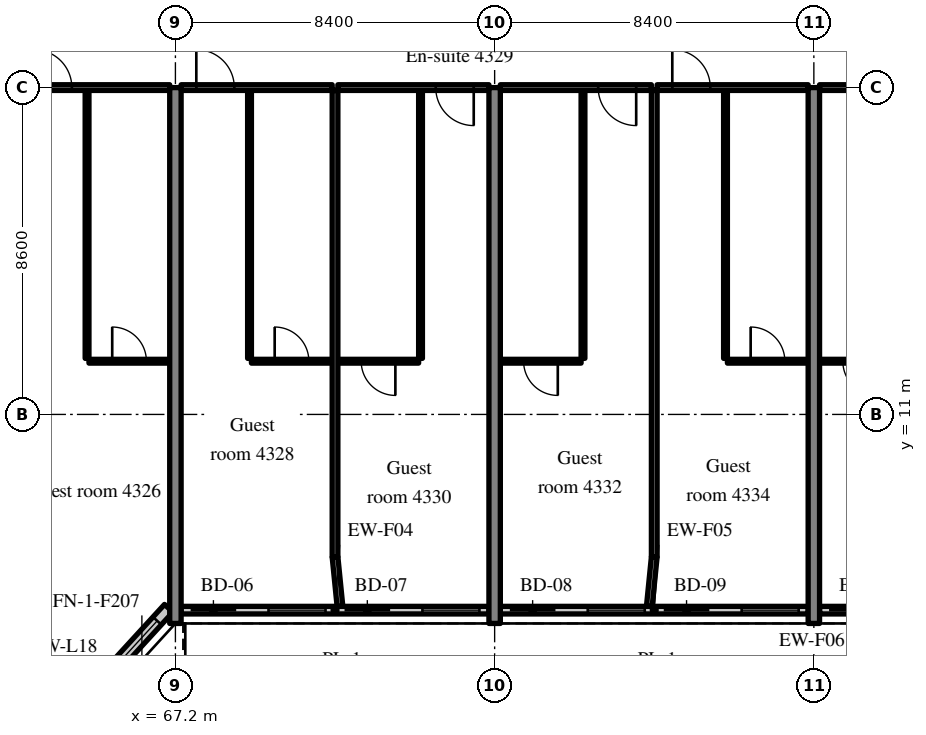
"""IFC4 building model, lengths in metres.
Left out: names, types, materials, properties, quantities, classifications, styles, units other than length and angle.
Written with IfcOpenShell. Run it as: python <this file> out.ifc"""

import sys

from ifc_helpers import new_model, si_unit, direction, frame, frame_2d, origin, place, context, subcontext, project, spatial, rectangle, extrude, source, transform, mapped, element, fill, save


model = new_model("IFC4")
c1 = context("Model", 3, precision=1e-05, world=origin(), true_north=direction((0.0, 1.0)))
c2 = subcontext(c1, "Body", "Model", "MODEL_VIEW")
j1 = project(units=[si_unit("LENGTHUNIT", "METRE"), si_unit("PLANEANGLEUNIT", "RADIAN")], contexts=[c1])
p1 = place(None, origin())
s1 = spatial("IfcSite", under=j1, at=p1, CompositionType="ELEMENT")
p2 = place(p1, origin())
s2 = spatial("IfcBuilding", under=s1, at=p2, CompositionType="ELEMENT")
p3 = place(p2, frame((0.0, 0.0, 178.2)))
s3 = spatial("IfcBuildingStorey", under=s2, at=p3, CompositionType="ELEMENT", Elevation=178.2)
m1 = source(origin(), c2, "Body", "SweptSolid", [
    extrude(rectangle(XDim=14.1, YDim=0.3, at=frame_2d((7.05, 0.0))), origin(), (0.0, 0.0, 1.0), 3.52),
])
for number, where, z_axis, x_axis in (
    (1, (67.2, 5.5, 0.0), (0.0, 0.0, 1.0), (0.0, 1.0, 0.0)),
    (2, (75.6, 5.5, 0.0), (0.0, 0.0, 1.0), (0.0, 1.0, 0.0)),
    (3, (84.0, 5.5, 0.0), (0.0, 0.0, 1.0), (0.0, 1.0, 0.0)),
):
    element("IfcWall", number, at=place(p3, frame(where, z_axis=z_axis, x_axis=x_axis)), inside=s3, PredefinedType="SHEAR", context=c2, shape_type="MappedRepresentation", body=[
        mapped(m1, transform((0.0, 0.0, 0.0), scale=1.0)),
    ])
m2 = source(origin(), c2, "Body", "SweptSolid", [
    extrude(rectangle(XDim=2.398, YDim=0.3, at=frame_2d((1.199, 0.0))), origin(), (0.0, 0.0, 1.0), 3.52),
])
p4 = place(p3, frame((65.404, 4.131, 0.0), z_axis=(0.0, 0.0, 1.0), x_axis=(0.675374189419, 0.737475222815, 0.0)))
e4 = element("IfcWall", 4, at=p4, inside=s3, PredefinedType="SOLIDWALL", context=c2, shape_type="MappedRepresentation", body=[
    mapped(m2, transform((0.0, 0.0, 0.0), scale=1.0)),
])
m3 = source(origin(), c2, "Body", "SweptSolid", [
    extrude(rectangle(XDim=1.5, YDim=2.0, at=frame_2d((0.75, 1.0))), frame((0.0, 0.16, 0.0), z_axis=(0.0, -1.0, 0.0), x_axis=(1.0, 0.0, 0.0)), (0.0, 0.0, 1.0), 0.32),
])
p5 = place(p4, frame((0.449, 0.0, 0.9)))
e5 = element("IfcOpeningElement", 5, at=p5, cuts=e4, PredefinedType="OPENING", context=c2, shape_type="MappedRepresentation", body=[
    mapped(m3, transform((0.0, 0.0, 0.0), scale=1.0)),
])
m4 = source(origin(), c2, "Body", "SweptSolid", [
    extrude(rectangle(XDim=8.1, YDim=0.2, at=frame_2d((4.05, 0.0))), origin(), (0.0, 0.0, 1.0), 2.87),
])
p6 = place(p3, frame((67.35, 5.85, 0.0), z_axis=(0.0, 0.0, 1.0), x_axis=(1.0, 0.0, 0.0)))
e6 = element("IfcWall", 6, at=p6, inside=s3, PredefinedType="SOLIDWALL", context=c2, shape_type="MappedRepresentation", body=[
    mapped(m4, transform((0.0, 0.0, 0.0), scale=1.0)),
])
m5 = source(origin(), c2, "Body", "SweptSolid", [
    extrude(rectangle(XDim=1.2, YDim=2.4, at=frame_2d((0.6, 1.2))), frame((0.0, 0.11, 0.0), z_axis=(0.0, -1.0, 0.0), x_axis=(1.0, 0.0, 0.0)), (0.0, 0.0, 1.0), 0.22),
])
p7 = place(p6, frame((0.25, 0.0, 0.0)))
e7 = element("IfcOpeningElement", 7, at=p7, cuts=e6, PredefinedType="OPENING", context=c2, shape_type="MappedRepresentation", body=[
    mapped(m5, transform((0.0, 0.0, 0.0), scale=1.0)),
])
m6 = source(origin(), c2, "Body", "SweptSolid", [
    extrude(rectangle(XDim=1.5, YDim=1.5, at=frame_2d((0.75, 0.75))), frame((0.0, 0.11, 0.0), z_axis=(0.0, -1.0, 0.0), x_axis=(1.0, 0.0, 0.0)), (0.0, 0.0, 1.0), 0.22),
])
p8 = place(p6, frame((2.3, 0.0, 0.9)))
e8 = element("IfcOpeningElement", 8, at=p8, cuts=e6, PredefinedType="OPENING", context=c2, shape_type="MappedRepresentation", body=[
    mapped(m6, transform((0.0, 0.0, 0.0), scale=1.0)),
])
p9 = place(p6, frame((4.3, 0.0, 0.0)))
e9 = element("IfcOpeningElement", 9, at=p9, cuts=e6, PredefinedType="OPENING", context=c2, shape_type="MappedRepresentation", body=[
    mapped(m5, transform((0.0, 0.0, 0.0), scale=1.0)),
])
p10 = place(p6, frame((6.35, 0.0, 0.9)))
e10 = element("IfcOpeningElement", 10, at=p10, cuts=e6, PredefinedType="OPENING", context=c2, shape_type="MappedRepresentation", body=[
    mapped(m6, transform((0.0, 0.0, 0.0), scale=1.0)),
])
m7 = source(origin(), c2, "Body", "SweptSolid", [
    extrude(rectangle(XDim=8.1, YDim=0.2, at=frame_2d((4.05, 0.0))), origin(), (0.0, 0.0, 1.0), 2.87),
])
p11 = place(p3, frame((75.75, 5.85, 0.0), z_axis=(0.0, 0.0, 1.0), x_axis=(1.0, 0.0, 0.0)))
e11 = element("IfcWall", 11, at=p11, inside=s3, PredefinedType="SOLIDWALL", context=c2, shape_type="MappedRepresentation", body=[
    mapped(m7, transform((0.0, 0.0, 0.0), scale=1.0)),
])
p12 = place(p11, frame((0.25, 0.0, 0.0)))
e12 = element("IfcOpeningElement", 12, at=p12, cuts=e11, PredefinedType="OPENING", context=c2, shape_type="MappedRepresentation", body=[
    mapped(m5, transform((0.0, 0.0, 0.0), scale=1.0)),
])
p13 = place(p11, frame((2.3, 0.0, 0.9)))
e13 = element("IfcOpeningElement", 13, at=p13, cuts=e11, PredefinedType="OPENING", context=c2, shape_type="MappedRepresentation", body=[
    mapped(m6, transform((0.0, 0.0, 0.0), scale=1.0)),
])
p14 = place(p11, frame((4.3, 0.0, 0.0)))
e14 = element("IfcOpeningElement", 14, at=p14, cuts=e11, PredefinedType="OPENING", context=c2, shape_type="MappedRepresentation", body=[
    mapped(m5, transform((0.0, 0.0, 0.0), scale=1.0)),
])
p15 = place(p11, frame((6.35, 0.0, 0.9)))
e15 = element("IfcOpeningElement", 15, at=p15, cuts=e11, PredefinedType="OPENING", context=c2, shape_type="MappedRepresentation", body=[
    mapped(m6, transform((0.0, 0.0, 0.0), scale=1.0)),
])
m8 = source(origin(), c2, "Body", "SweptSolid", [
    extrude(rectangle(XDim=4.105, YDim=0.2, at=frame_2d((2.052, 0.0))), origin(), (0.0, 0.0, 1.0), 2.87),
])
p16 = place(p3, frame((84.15, 5.85, 0.0), z_axis=(0.0, 0.0, 1.0), x_axis=(1.0, 0.0, 0.0)))
e16 = element("IfcWall", 16, at=p16, inside=s3, PredefinedType="SOLIDWALL", context=c2, shape_type="MappedRepresentation", body=[
    mapped(m8, transform((0.0, 0.0, 0.0), scale=1.0)),
])
p17 = place(p16, frame((0.25, 0.0, 0.0)))
e17 = element("IfcOpeningElement", 17, at=p17, cuts=e16, PredefinedType="OPENING", context=c2, shape_type="MappedRepresentation", body=[
    mapped(m5, transform((0.0, 0.0, 0.0), scale=1.0)),
])
p18 = place(p16, frame((2.355, 0.0, 0.9)))
e18 = element("IfcOpeningElement", 18, at=p18, cuts=e16, PredefinedType="OPENING", context=c2, shape_type="MappedRepresentation", body=[
    mapped(m6, transform((0.0, 0.0, 0.0), scale=1.0)),
])
m9 = source(origin(), c2, "Body", "SweptSolid", [
    extrude(rectangle(XDim=7.05, YDim=0.1, at=frame_2d((3.525, 0.0))), origin(), (0.0, 0.0, 1.0), 3.52),
])
p19 = place(p3, frame((64.875, 12.475, 0.0), z_axis=(0.0, 0.0, 1.0), x_axis=(0.0, 1.0, 0.0)))
e19 = element("IfcWall", 19, at=p19, inside=s3, PredefinedType="PARTITIONING", context=c2, shape_type="MappedRepresentation", body=[
    mapped(m9, transform((0.0, 0.0, 0.0), scale=1.0)),
])
m10 = source(origin(), c2, "Body", "SweptSolid", [
    extrude(rectangle(XDim=2.125, YDim=0.1, at=frame_2d((1.062, 0.0))), origin(), (0.0, 0.0, 1.0), 3.52),
])
p20 = place(p3, frame((64.925, 12.4, 0.0), z_axis=(0.0, 0.0, 1.0), x_axis=(1.0, 0.0, 0.0)))
e20 = element("IfcWall", 20, at=p20, inside=s3, PredefinedType="PARTITIONING", context=c2, shape_type="MappedRepresentation", body=[
    mapped(m10, transform((0.0, 0.0, 0.0), scale=1.0)),
])
m11 = source(origin(), c2, "Body", "SweptSolid", [
    extrude(rectangle(XDim=0.9, YDim=2.1, at=frame_2d((0.45, 1.05))), frame((0.0, 0.06, 0.0), z_axis=(0.0, -1.0, 0.0), x_axis=(1.0, 0.0, 0.0)), (0.0, 0.0, 1.0), 0.12),
])
p21 = place(p20, frame((0.612, 0.0, 0.0)))
e21 = element("IfcOpeningElement", 21, at=p21, cuts=e20, PredefinedType="OPENING", context=c2, shape_type="MappedRepresentation", body=[
    mapped(m11, transform((0.0, 0.0, 0.0), scale=1.0)),
])
m12 = source(origin(), c2, "Body", "SweptSolid", [
    extrude(rectangle(XDim=3.975, YDim=0.15, at=frame_2d((1.988, 0.0))), origin(), (0.0, 0.0, 1.0), 2.82),
])
p22 = place(p3, frame((63.075, 19.6, 0.0), z_axis=(0.0, 0.0, 1.0), x_axis=(1.0, 0.0, 0.0)))
e22 = element("IfcWall", 22, at=p22, inside=s3, PredefinedType="PARTITIONING", context=c2, shape_type="MappedRepresentation", body=[
    mapped(m12, transform((0.0, 0.0, 0.0), scale=1.0)),
])
m13 = source(origin(), c2, "Body", "SweptSolid", [
    extrude(rectangle(XDim=1.0, YDim=2.1, at=frame_2d((0.5, 1.05))), frame((0.0, 0.085, 0.0), z_axis=(0.0, -1.0, 0.0), x_axis=(1.0, 0.0, 0.0)), (0.0, 0.0, 1.0), 0.17),
])
p23 = place(p22, frame((0.4, 0.0, 0.0)))
e23 = element("IfcOpeningElement", 23, at=p23, cuts=e22, PredefinedType="OPENING", context=c2, shape_type="MappedRepresentation", body=[
    mapped(m13, transform((0.0, 0.0, 0.0), scale=1.0)),
])
p24 = place(p3, frame((69.15, 12.475, 0.0), z_axis=(0.0, 0.0, 1.0), x_axis=(0.0, 1.0, 0.0)))
e24 = element("IfcWall", 24, at=p24, inside=s3, PredefinedType="PARTITIONING", context=c2, shape_type="MappedRepresentation", body=[
    mapped(m9, transform((0.0, 0.0, 0.0), scale=1.0)),
])
p25 = place(p3, frame((69.2, 12.4, 0.0), z_axis=(0.0, 0.0, 1.0), x_axis=(1.0, 0.0, 0.0)))
e25 = element("IfcWall", 25, at=p25, inside=s3, PredefinedType="PARTITIONING", context=c2, shape_type="MappedRepresentation", body=[
    mapped(m10, transform((0.0, 0.0, 0.0), scale=1.0)),
])
p26 = place(p25, frame((0.612, 0.0, 0.0)))
e26 = element("IfcOpeningElement", 26, at=p26, cuts=e25, PredefinedType="OPENING", context=c2, shape_type="MappedRepresentation", body=[
    mapped(m11, transform((0.0, 0.0, 0.0), scale=1.0)),
])
m14 = source(origin(), c2, "Body", "SweptSolid", [
    extrude(rectangle(XDim=3.975, YDim=0.15, at=frame_2d((1.987, 0.0))), origin(), (0.0, 0.0, 1.0), 2.82),
])
p27 = place(p3, frame((67.35, 19.6, 0.0), z_axis=(0.0, 0.0, 1.0), x_axis=(1.0, 0.0, 0.0)))
e27 = element("IfcWall", 27, at=p27, inside=s3, PredefinedType="PARTITIONING", context=c2, shape_type="MappedRepresentation", body=[
    mapped(m14, transform((0.0, 0.0, 0.0), scale=1.0)),
])
p28 = place(p27, frame((0.4, 0.0, 0.0)))
e28 = element("IfcOpeningElement", 28, at=p28, cuts=e27, PredefinedType="OPENING", context=c2, shape_type="MappedRepresentation", body=[
    mapped(m13, transform((0.0, 0.0, 0.0), scale=1.0)),
])
p29 = place(p3, frame((73.65, 12.475, 0.0), z_axis=(0.0, 0.0, 1.0), x_axis=(0.0, 1.0, 0.0)))
e29 = element("IfcWall", 29, at=p29, inside=s3, PredefinedType="PARTITIONING", context=c2, shape_type="MappedRepresentation", body=[
    mapped(m9, transform((0.0, 0.0, 0.0), scale=1.0)),
])
p30 = place(p3, frame((71.475, 12.4, 0.0), z_axis=(0.0, 0.0, 1.0), x_axis=(1.0, 0.0, 0.0)))
e30 = element("IfcWall", 30, at=p30, inside=s3, PredefinedType="PARTITIONING", context=c2, shape_type="MappedRepresentation", body=[
    mapped(m10, transform((0.0, 0.0, 0.0), scale=1.0)),
])
p31 = place(p30, frame((0.613, 0.0, 0.0)))
e31 = element("IfcOpeningElement", 31, at=p31, cuts=e30, PredefinedType="OPENING", context=c2, shape_type="MappedRepresentation", body=[
    mapped(m11, transform((0.0, 0.0, 0.0), scale=1.0)),
])
p32 = place(p3, frame((71.475, 19.6, 0.0), z_axis=(0.0, 0.0, 1.0), x_axis=(1.0, 0.0, 0.0)))
e32 = element("IfcWall", 32, at=p32, inside=s3, PredefinedType="PARTITIONING", context=c2, shape_type="MappedRepresentation", body=[
    mapped(m14, transform((0.0, 0.0, 0.0), scale=1.0)),
])
p33 = place(p32, frame((2.575, 0.0, 0.0)))
e33 = element("IfcOpeningElement", 33, at=p33, cuts=e32, PredefinedType="OPENING", context=c2, shape_type="MappedRepresentation", body=[
    mapped(m13, transform((0.0, 0.0, 0.0), scale=1.0)),
])
m15 = source(origin(), c2, "Body", "SweptSolid", [
    extrude(rectangle(XDim=12.275, YDim=0.15, at=frame_2d((6.137, 0.0))), origin(), (0.0, 0.0, 1.0), 3.52),
])
p34 = place(p3, frame((71.4, 7.25, 0.0), z_axis=(0.0, 0.0, 1.0), x_axis=(0.0, 1.0, 0.0)))
e34 = element("IfcWall", 34, at=p34, inside=s3, PredefinedType="PARTITIONING", context=c2, shape_type="MappedRepresentation", body=[
    mapped(m15, transform((0.0, 0.0, 0.0), scale=1.0)),
])
p35 = place(p3, frame((77.925, 12.475, 0.0), z_axis=(0.0, 0.0, 1.0), x_axis=(0.0, 1.0, 0.0)))
e35 = element("IfcWall", 35, at=p35, inside=s3, PredefinedType="PARTITIONING", context=c2, shape_type="MappedRepresentation", body=[
    mapped(m9, transform((0.0, 0.0, 0.0), scale=1.0)),
])
p36 = place(p3, frame((75.75, 12.4, 0.0), z_axis=(0.0, 0.0, 1.0), x_axis=(1.0, 0.0, 0.0)))
e36 = element("IfcWall", 36, at=p36, inside=s3, PredefinedType="PARTITIONING", context=c2, shape_type="MappedRepresentation", body=[
    mapped(m10, transform((0.0, 0.0, 0.0), scale=1.0)),
])
p37 = place(p36, frame((0.612, 0.0, 0.0)))
e37 = element("IfcOpeningElement", 37, at=p37, cuts=e36, PredefinedType="OPENING", context=c2, shape_type="MappedRepresentation", body=[
    mapped(m11, transform((0.0, 0.0, 0.0), scale=1.0)),
])
p38 = place(p3, frame((75.75, 19.6, 0.0), z_axis=(0.0, 0.0, 1.0), x_axis=(1.0, 0.0, 0.0)))
e38 = element("IfcWall", 38, at=p38, inside=s3, PredefinedType="PARTITIONING", context=c2, shape_type="MappedRepresentation", body=[
    mapped(m12, transform((0.0, 0.0, 0.0), scale=1.0)),
])
p39 = place(p38, frame((2.575, 0.0, 0.0)))
e39 = element("IfcOpeningElement", 39, at=p39, cuts=e38, PredefinedType="OPENING", context=c2, shape_type="MappedRepresentation", body=[
    mapped(m13, transform((0.0, 0.0, 0.0), scale=1.0)),
])
p40 = place(p3, frame((81.675, 12.475, 0.0), z_axis=(0.0, 0.0, 1.0), x_axis=(0.0, 1.0, 0.0)))
e40 = element("IfcWall", 40, at=p40, inside=s3, PredefinedType="PARTITIONING", context=c2, shape_type="MappedRepresentation", body=[
    mapped(m9, transform((0.0, 0.0, 0.0), scale=1.0)),
])
p41 = place(p3, frame((81.725, 12.4, 0.0), z_axis=(0.0, 0.0, 1.0), x_axis=(1.0, 0.0, 0.0)))
e41 = element("IfcWall", 41, at=p41, inside=s3, PredefinedType="PARTITIONING", context=c2, shape_type="MappedRepresentation", body=[
    mapped(m10, transform((0.0, 0.0, 0.0), scale=1.0)),
])
p42 = place(p41, frame((0.612, 0.0, 0.0)))
e42 = element("IfcOpeningElement", 42, at=p42, cuts=e41, PredefinedType="OPENING", context=c2, shape_type="MappedRepresentation", body=[
    mapped(m11, transform((0.0, 0.0, 0.0), scale=1.0)),
])
p43 = place(p3, frame((79.875, 19.6, 0.0), z_axis=(0.0, 0.0, 1.0), x_axis=(1.0, 0.0, 0.0)))
e43 = element("IfcWall", 43, at=p43, inside=s3, PredefinedType="PARTITIONING", context=c2, shape_type="MappedRepresentation", body=[
    mapped(m12, transform((0.0, 0.0, 0.0), scale=1.0)),
])
p44 = place(p43, frame((0.4, 0.0, 0.0)))
e44 = element("IfcOpeningElement", 44, at=p44, cuts=e43, PredefinedType="OPENING", context=c2, shape_type="MappedRepresentation", body=[
    mapped(m13, transform((0.0, 0.0, 0.0), scale=1.0)),
])
p45 = place(p3, frame((79.8, 7.25, 0.0), z_axis=(0.0, 0.0, 1.0), x_axis=(0.0, 1.0, 0.0)))
e45 = element("IfcWall", 45, at=p45, inside=s3, PredefinedType="PARTITIONING", context=c2, shape_type="MappedRepresentation", body=[
    mapped(m15, transform((0.0, 0.0, 0.0), scale=1.0)),
])
p46 = place(p3, frame((84.15, 12.4, 0.0), z_axis=(0.0, 0.0, 1.0), x_axis=(1.0, 0.0, 0.0)))
e46 = element("IfcWall", 46, at=p46, inside=s3, PredefinedType="PARTITIONING", context=c2, shape_type="MappedRepresentation", body=[
    mapped(m10, transform((0.0, 0.0, 0.0), scale=1.0)),
])
p47 = place(p46, frame((0.612, 0.0, 0.0)))
e47 = element("IfcOpeningElement", 47, at=p47, cuts=e46, PredefinedType="OPENING", context=c2, shape_type="MappedRepresentation", body=[
    mapped(m11, transform((0.0, 0.0, 0.0), scale=1.0)),
])
p48 = place(p3, frame((84.15, 19.6, 0.0), z_axis=(0.0, 0.0, 1.0), x_axis=(1.0, 0.0, 0.0)))
e48 = element("IfcWall", 48, at=p48, inside=s3, PredefinedType="PARTITIONING", context=c2, shape_type="MappedRepresentation", body=[
    mapped(m12, transform((0.0, 0.0, 0.0), scale=1.0)),
])
p49 = place(p48, frame((2.575, 0.0, 0.0)))
e49 = element("IfcOpeningElement", 49, at=p49, cuts=e48, PredefinedType="OPENING", context=c2, shape_type="MappedRepresentation", body=[
    mapped(m13, transform((0.0, 0.0, 0.0), scale=1.0)),
])
m16 = source(origin(), c2, "Body", "SweptSolid", [
    extrude(rectangle(XDim=1.307, YDim=0.15, at=frame_2d((0.653, 0.0))), origin(), (0.0, 0.0, 1.0), 3.52),
])
for number, where, z_axis, x_axis in (
    (50, (71.53, 5.95, 0.0), (0.0, 0.0, 1.0), (-0.1, 0.995, 0.0)),
    (51, (79.67, 5.95, 0.0), (0.0, 0.0, 1.0), (0.1, 0.995, 0.0)),
):
    element("IfcWall", number, at=place(p3, frame(where, z_axis=z_axis, x_axis=x_axis)), inside=s3, PredefinedType="PARTITIONING", context=c2, shape_type="MappedRepresentation", body=[
        mapped(m16, transform((0.0, 0.0, 0.0), scale=1.0)),
    ])
m17 = source(origin(), c2, "Body", "SweptSolid", [
    extrude(rectangle(XDim=1.5, YDim=2.0, at=frame_2d((0.75, 1.0))), frame((0.0, 0.03, 0.0), z_axis=(0.0, -1.0, 0.0), x_axis=(1.0, 0.0, 0.0)), (0.0, 0.0, 1.0), 0.06),
])
p50 = place(p5, origin())
e52 = element("IfcWindow", 52, at=p50, inside=s3, PartitioningType="SINGLE_PANEL", PredefinedType="WINDOW", context=c2, shape_type="MappedRepresentation", body=[
    mapped(m17, transform((0.0, 0.0, 0.0), scale=1.0)),
])
fill(e5, e52)
m18 = source(origin(), c2, "Body", "SweptSolid", [
    extrude(rectangle(XDim=1.2, YDim=2.4, at=frame_2d((0.6, 1.2))), frame((0.0, 0.025, 0.0), z_axis=(0.0, -1.0, 0.0), x_axis=(1.0, 0.0, 0.0)), (0.0, 0.0, 1.0), 0.05),
])
p51 = place(p7, origin())
e53 = element("IfcDoor", 53, at=p51, inside=s3, OperationType="SLIDING_TO_RIGHT", PredefinedType="DOOR", context=c2, shape_type="MappedRepresentation", body=[
    mapped(m18, transform((0.0, 0.0, 0.0), scale=1.0)),
])
fill(e7, e53)
m19 = source(origin(), c2, "Body", "SweptSolid", [
    extrude(rectangle(XDim=1.5, YDim=1.5, at=frame_2d((0.75, 0.75))), frame((0.0, 0.03, 0.0), z_axis=(0.0, -1.0, 0.0), x_axis=(1.0, 0.0, 0.0)), (0.0, 0.0, 1.0), 0.06),
])
p52 = place(p8, origin())
e54 = element("IfcWindow", 54, at=p52, inside=s3, PartitioningType="SINGLE_PANEL", PredefinedType="WINDOW", context=c2, shape_type="MappedRepresentation", body=[
    mapped(m19, transform((0.0, 0.0, 0.0), scale=1.0)),
])
fill(e8, e54)
p53 = place(p9, origin())
e55 = element("IfcDoor", 55, at=p53, inside=s3, OperationType="SLIDING_TO_LEFT", PredefinedType="DOOR", context=c2, shape_type="MappedRepresentation", body=[
    mapped(m18, transform((0.0, 0.0, 0.0), scale=1.0)),
])
fill(e9, e55)
p54 = place(p10, origin())
e56 = element("IfcWindow", 56, at=p54, inside=s3, PartitioningType="SINGLE_PANEL", PredefinedType="WINDOW", context=c2, shape_type="MappedRepresentation", body=[
    mapped(m19, transform((0.0, 0.0, 0.0), scale=1.0)),
])
fill(e10, e56)
p55 = place(p12, origin())
e57 = element("IfcDoor", 57, at=p55, inside=s3, OperationType="SLIDING_TO_RIGHT", PredefinedType="DOOR", context=c2, shape_type="MappedRepresentation", body=[
    mapped(m18, transform((0.0, 0.0, 0.0), scale=1.0)),
])
fill(e12, e57)
p56 = place(p13, origin())
e58 = element("IfcWindow", 58, at=p56, inside=s3, PartitioningType="SINGLE_PANEL", PredefinedType="WINDOW", context=c2, shape_type="MappedRepresentation", body=[
    mapped(m19, transform((0.0, 0.0, 0.0), scale=1.0)),
])
fill(e13, e58)
p57 = place(p14, origin())
e59 = element("IfcDoor", 59, at=p57, inside=s3, OperationType="SLIDING_TO_LEFT", PredefinedType="DOOR", context=c2, shape_type="MappedRepresentation", body=[
    mapped(m18, transform((0.0, 0.0, 0.0), scale=1.0)),
])
fill(e14, e59)
p58 = place(p15, origin())
e60 = element("IfcWindow", 60, at=p58, inside=s3, PartitioningType="SINGLE_PANEL", PredefinedType="WINDOW", context=c2, shape_type="MappedRepresentation", body=[
    mapped(m19, transform((0.0, 0.0, 0.0), scale=1.0)),
])
fill(e15, e60)
p59 = place(p17, origin())
e61 = element("IfcDoor", 61, at=p59, inside=s3, OperationType="SLIDING_TO_RIGHT", PredefinedType="DOOR", context=c2, shape_type="MappedRepresentation", body=[
    mapped(m18, transform((0.0, 0.0, 0.0), scale=1.0)),
])
fill(e17, e61)
m20 = source(origin(), c2, "Body", "SweptSolid", [
    extrude(rectangle(XDim=0.9, YDim=2.1, at=frame_2d((0.45, 1.05))), frame((0.0, 0.025, 0.0), z_axis=(0.0, -1.0, 0.0), x_axis=(1.0, 0.0, 0.0)), (0.0, 0.0, 1.0), 0.05),
])
p60 = place(p21, origin())
e62 = element("IfcDoor", 62, at=p60, inside=s3, OperationType="SINGLE_SWING_LEFT", PredefinedType="DOOR", context=c2, shape_type="MappedRepresentation", body=[
    mapped(m20, transform((0.0, 0.0, 0.0), scale=1.0)),
])
fill(e21, e62)
m21 = source(origin(), c2, "Body", "SweptSolid", [
    extrude(rectangle(XDim=1.0, YDim=2.1, at=frame_2d((0.5, 1.05))), frame((0.0, 0.025, 0.0), z_axis=(0.0, -1.0, 0.0), x_axis=(1.0, 0.0, 0.0)), (0.0, 0.0, 1.0), 0.05),
])
p61 = place(p23, origin())
e63 = element("IfcDoor", 63, at=p61, inside=s3, OperationType="SINGLE_SWING_LEFT", PredefinedType="DOOR", context=c2, shape_type="MappedRepresentation", body=[
    mapped(m21, transform((0.0, 0.0, 0.0), scale=1.0)),
])
fill(e23, e63)
p62 = place(p26, origin())
e64 = element("IfcDoor", 64, at=p62, inside=s3, OperationType="SINGLE_SWING_LEFT", PredefinedType="DOOR", context=c2, shape_type="MappedRepresentation", body=[
    mapped(m20, transform((0.0, 0.0, 0.0), scale=1.0)),
])
fill(e26, e64)
p63 = place(p28, origin())
e65 = element("IfcDoor", 65, at=p63, inside=s3, OperationType="SINGLE_SWING_LEFT", PredefinedType="DOOR", context=c2, shape_type="MappedRepresentation", body=[
    mapped(m21, transform((0.0, 0.0, 0.0), scale=1.0)),
])
fill(e28, e65)
p64 = place(p31, origin())
e66 = element("IfcDoor", 66, at=p64, inside=s3, OperationType="SINGLE_SWING_RIGHT", PredefinedType="DOOR", context=c2, shape_type="MappedRepresentation", body=[
    mapped(m20, transform((0.0, 0.0, 0.0), scale=1.0)),
])
fill(e31, e66)
p65 = place(p33, origin())
e67 = element("IfcDoor", 67, at=p65, inside=s3, OperationType="SINGLE_SWING_RIGHT", PredefinedType="DOOR", context=c2, shape_type="MappedRepresentation", body=[
    mapped(m21, transform((0.0, 0.0, 0.0), scale=1.0)),
])
fill(e33, e67)
p66 = place(p37, origin())
e68 = element("IfcDoor", 68, at=p66, inside=s3, OperationType="SINGLE_SWING_RIGHT", PredefinedType="DOOR", context=c2, shape_type="MappedRepresentation", body=[
    mapped(m20, transform((0.0, 0.0, 0.0), scale=1.0)),
])
fill(e37, e68)
p67 = place(p39, origin())
e69 = element("IfcDoor", 69, at=p67, inside=s3, OperationType="SINGLE_SWING_RIGHT", PredefinedType="DOOR", context=c2, shape_type="MappedRepresentation", body=[
    mapped(m21, transform((0.0, 0.0, 0.0), scale=1.0)),
])
fill(e39, e69)
p68 = place(p42, origin())
e70 = element("IfcDoor", 70, at=p68, inside=s3, OperationType="SINGLE_SWING_LEFT", PredefinedType="DOOR", context=c2, shape_type="MappedRepresentation", body=[
    mapped(m20, transform((0.0, 0.0, 0.0), scale=1.0)),
])
fill(e42, e70)
p69 = place(p44, origin())
e71 = element("IfcDoor", 71, at=p69, inside=s3, OperationType="SINGLE_SWING_LEFT", PredefinedType="DOOR", context=c2, shape_type="MappedRepresentation", body=[
    mapped(m21, transform((0.0, 0.0, 0.0), scale=1.0)),
])
fill(e44, e71)
p70 = place(p47, origin())
e72 = element("IfcDoor", 72, at=p70, inside=s3, OperationType="SINGLE_SWING_RIGHT", PredefinedType="DOOR", context=c2, shape_type="MappedRepresentation", body=[
    mapped(m20, transform((0.0, 0.0, 0.0), scale=1.0)),
])
fill(e47, e72)
save(model, sys.argv[1])
